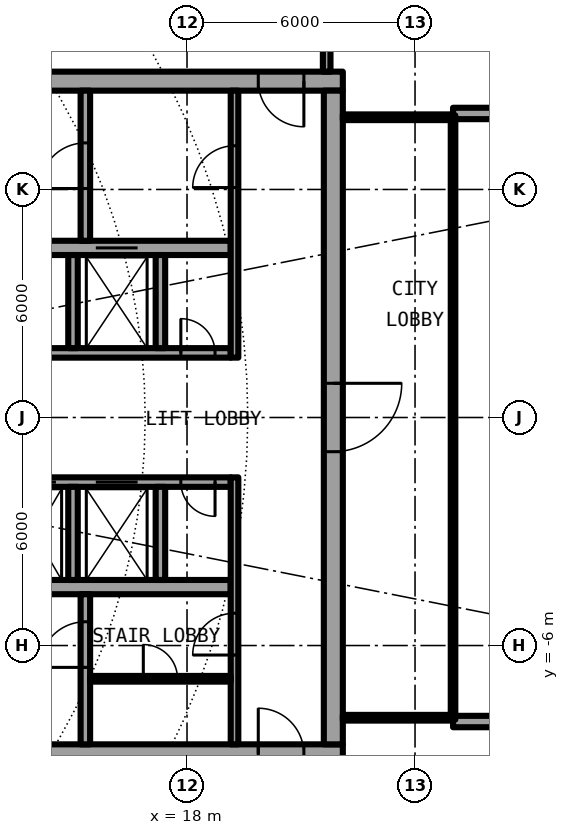
"""IFC4 building model, lengths in metres.
Left out: names, types, materials, properties, quantities, classifications, styles, units other than length and angle.
Written with IfcOpenShell. Run it as: python <this file> out.ifc"""

import sys

from ifc_helpers import new_model, si_unit, direction, frame, frame_2d, origin, place, context, subcontext, project, spatial, rectangle, extrude, element, fill, save


model = new_model("IFC4")
c1 = context("Model", 3, precision=1e-05, world=origin(), true_north=direction((0.0, 1.0)))
c2 = subcontext(c1, "Body", "Model", "MODEL_VIEW")
j1 = project(units=[si_unit("LENGTHUNIT", "METRE"), si_unit("PLANEANGLEUNIT", "RADIAN")], contexts=[c1])
p1 = place(None, origin())
s1 = spatial("IfcSite", under=j1, at=p1, CompositionType="ELEMENT")
p2 = place(p1, origin())
s2 = spatial("IfcBuilding", under=s1, at=p2, CompositionType="ELEMENT")
p3 = place(p2, frame((0.0, 0.0, 173.8)))
s3 = spatial("IfcBuildingStorey", under=s2, at=p3, CompositionType="ELEMENT", Elevation=173.8)
for number, where, z_axis, x_axis in (
    (1, (25.0, 8.0, 0.0), (0.0, 0.0, 1.0), (1.0, 0.0, 0.0)),
    (2, (25.0, -8.0, 0.0), (0.0, 0.0, 1.0), (1.0, 0.0, 0.0)),
):
    element("IfcWall", number, at=place(p3, frame(where, z_axis=z_axis, x_axis=x_axis)), inside=s3, PredefinedType="SOLIDWALL", context=c2, shape_type="SweptSolid", body=[
        extrude(rectangle(XDim=2.667, YDim=0.3, at=frame_2d((1.333, 0.0))), origin(), (0.0, 0.0, 1.0), 2.7),
    ])
p4 = place(p3, frame((22.1, 8.85, 0.0), z_axis=(0.0, 0.0, 1.0), x_axis=(-1.0, 0.0, 0.0)))
e3 = element("IfcWall", 3, at=p4, inside=s3, PredefinedType="SHEAR", context=c2, shape_type="SweptSolid", body=[
    extrude(rectangle(XDim=13.6, YDim=0.5, at=frame_2d((6.8, 0.0))), origin(), (0.0, 0.0, 1.0), 3.05),
])
p5 = place(p4, frame((1.025, 0.0, 0.0)))
e4 = element("IfcOpeningElement", 4, at=p5, cuts=e3, PredefinedType="OPENING", context=c2, shape_type="SweptSolid", body=[
    extrude(rectangle(XDim=1.2, YDim=2.3, at=frame_2d((0.6, 1.15))), frame((0.0, 0.26, 0.0), z_axis=(0.0, -1.0, 0.0), x_axis=(1.0, 0.0, 0.0)), (0.0, 0.0, 1.0), 0.52),
])
p6 = place(p3, frame((8.5, -8.85, 0.0), z_axis=(0.0, 0.0, 1.0), x_axis=(1.0, 0.0, 0.0)))
e5 = element("IfcWall", 5, at=p6, inside=s3, PredefinedType="SHEAR", context=c2, shape_type="SweptSolid", body=[
    extrude(rectangle(XDim=13.6, YDim=0.5, at=frame_2d((6.8, 0.0))), origin(), (0.0, 0.0, 1.0), 3.05),
])
p7 = place(p6, frame((11.375, 0.0, 0.0)))
e6 = element("IfcOpeningElement", 6, at=p7, cuts=e5, PredefinedType="OPENING", context=c2, shape_type="SweptSolid", body=[
    extrude(rectangle(XDim=1.2, YDim=2.3, at=frame_2d((0.6, 1.15))), frame((0.0, 0.26, 0.0), z_axis=(0.0, -1.0, 0.0), x_axis=(1.0, 0.0, 0.0)), (0.0, 0.0, 1.0), 0.52),
])
p8 = place(p3, frame((21.85, 8.6, 0.0), z_axis=(0.0, 0.0, 1.0), x_axis=(0.0, -1.0, 0.0)))
e7 = element("IfcWall", 7, at=p8, inside=s3, PredefinedType="SHEAR", context=c2, shape_type="SweptSolid", body=[
    extrude(rectangle(XDim=17.2, YDim=0.5, at=frame_2d((8.6, 0.0))), origin(), (0.0, 0.0, 1.0), 3.05),
])
p9 = place(p8, frame((7.7, 0.0, 0.0)))
e8 = element("IfcOpeningElement", 8, at=p9, cuts=e7, PredefinedType="OPENING", context=c2, shape_type="SweptSolid", body=[
    extrude(rectangle(XDim=1.8, YDim=2.3, at=frame_2d((0.9, 1.15))), frame((0.0, 0.26, 0.0), z_axis=(0.0, -1.0, 0.0), x_axis=(1.0, 0.0, 0.0)), (0.0, 0.0, 1.0), 0.52),
])
p10 = place(p3, frame((9.0, 1.7, 0.0), z_axis=(0.0, 0.0, 1.0), x_axis=(1.0, 0.0, 0.0)))
e9 = element("IfcWall", 9, at=p10, inside=s3, PredefinedType="SHEAR", context=c2, shape_type="SweptSolid", body=[
    extrude(rectangle(XDim=10.15, YDim=0.25, at=frame_2d((5.075, 0.0))), origin(), (0.0, 0.0, 1.0), 3.05),
])
p11 = place(p10, frame((0.262, 0.0, 0.0)))
e10 = element("IfcOpeningElement", 10, at=p11, cuts=e9, PredefinedType="OPENING", context=c2, shape_type="SweptSolid", body=[
    extrude(rectangle(XDim=0.9, YDim=2.3, at=frame_2d((0.45, 1.15))), frame((0.0, 0.135, 0.0), z_axis=(0.0, -1.0, 0.0), x_axis=(1.0, 0.0, 0.0)), (0.0, 0.0, 1.0), 0.27),
])
p12 = place(p10, frame((2.15, 0.0, 0.0)))
e11 = element("IfcOpeningElement", 11, at=p12, cuts=e9, PredefinedType="OPENING", context=c2, shape_type="SweptSolid", body=[
    extrude(rectangle(XDim=0.9, YDim=2.3, at=frame_2d((0.45, 1.15))), frame((0.0, 0.135, 0.0), z_axis=(0.0, -1.0, 0.0), x_axis=(1.0, 0.0, 0.0)), (0.0, 0.0, 1.0), 0.27),
])
p13 = place(p10, frame((4.375, 0.0, 0.0)))
e12 = element("IfcOpeningElement", 12, at=p13, cuts=e9, PredefinedType="OPENING", context=c2, shape_type="SweptSolid", body=[
    extrude(rectangle(XDim=0.9, YDim=2.3, at=frame_2d((0.45, 1.15))), frame((0.0, 0.135, 0.0), z_axis=(0.0, -1.0, 0.0), x_axis=(1.0, 0.0, 0.0)), (0.0, 0.0, 1.0), 0.27),
])
p14 = place(p10, frame((8.837, 0.0, 0.0)))
e13 = element("IfcOpeningElement", 13, at=p14, cuts=e9, PredefinedType="OPENING", context=c2, shape_type="SweptSolid", body=[
    extrude(rectangle(XDim=0.9, YDim=2.3, at=frame_2d((0.45, 1.15))), frame((0.0, 0.135, 0.0), z_axis=(0.0, -1.0, 0.0), x_axis=(1.0, 0.0, 0.0)), (0.0, 0.0, 1.0), 0.27),
])
p15 = place(p3, frame((9.0, 4.462, 0.0), z_axis=(0.0, 0.0, 1.0), x_axis=(1.0, 0.0, 0.0)))
e14 = element("IfcWall", 14, at=p15, inside=s3, PredefinedType="SHEAR", context=c2, shape_type="SweptSolid", body=[
    extrude(rectangle(XDim=10.15, YDim=0.375, at=frame_2d((5.075, 0.0))), origin(), (0.0, 0.0, 1.0), 3.05),
])
p16 = place(p15, frame((6.6, 0.0, 0.0)))
e15 = element("IfcOpeningElement", 15, at=p16, cuts=e14, PredefinedType="OPENING", context=c2, shape_type="SweptSolid", body=[
    extrude(rectangle(XDim=1.1, YDim=2.3, at=frame_2d((0.55, 1.15))), frame((0.0, 0.198, 0.0), z_axis=(0.0, -1.0, 0.0), x_axis=(1.0, 0.0, 0.0)), (0.0, 0.0, 1.0), 0.395),
])
p17 = place(p3, frame((15.325, 4.65, 0.0), z_axis=(0.0, 0.0, 1.0), x_axis=(0.0, 1.0, 0.0)))
e16 = element("IfcWall", 16, at=p17, inside=s3, PredefinedType="SHEAR", context=c2, shape_type="SweptSolid", body=[
    extrude(rectangle(XDim=3.95, YDim=0.25, at=frame_2d((1.975, 0.0))), origin(), (0.0, 0.0, 1.0), 3.05),
])
p18 = place(p17, frame((1.375, 0.0, 0.0)))
e17 = element("IfcOpeningElement", 17, at=p18, cuts=e16, PredefinedType="OPENING", context=c2, shape_type="SweptSolid", body=[
    extrude(rectangle(XDim=1.2, YDim=2.3, at=frame_2d((0.6, 1.15))), frame((0.0, 0.135, 0.0), z_axis=(0.0, -1.0, 0.0), x_axis=(1.0, 0.0, 0.0)), (0.0, 0.0, 1.0), 0.27),
])
for number, where, z_axis, x_axis in (
    (18, (15.0, 1.825, 0.0), (0.0, 0.0, 1.0), (0.0, 1.0, 0.0)),
    (19, (17.3, 1.825, 0.0), (0.0, 0.0, 1.0), (0.0, 1.0, 0.0)),
):
    element("IfcWall", number, at=place(p3, frame(where, z_axis=z_axis, x_axis=x_axis)), inside=s3, PredefinedType="SOLIDWALL", context=c2, shape_type="SweptSolid", body=[
        extrude(rectangle(XDim=2.45, YDim=0.25, at=frame_2d((1.225, 0.0))), origin(), (0.0, 0.0, 1.0), 2.7),
    ])
p19 = place(p3, frame((19.25, 1.575, 0.0), z_axis=(0.0, 0.0, 1.0), x_axis=(0.0, 1.0, 0.0)))
e20 = element("IfcWall", 20, at=p19, inside=s3, PredefinedType="SOLIDWALL", context=c2, shape_type="SweptSolid", body=[
    extrude(rectangle(XDim=7.025, YDim=0.2, at=frame_2d((3.513, 0.0))), origin(), (0.0, 0.0, 1.0), 2.7),
])
p20 = place(p19, frame((4.475, 0.0, 0.0)))
e21 = element("IfcOpeningElement", 21, at=p20, cuts=e20, PredefinedType="OPENING", context=c2, shape_type="SweptSolid", body=[
    extrude(rectangle(XDim=1.1, YDim=2.3, at=frame_2d((0.55, 1.15))), frame((0.0, 0.11, 0.0), z_axis=(0.0, -1.0, 0.0), x_axis=(1.0, 0.0, 0.0)), (0.0, 0.0, 1.0), 0.22),
])
p21 = place(p3, frame((19.15, -1.7, 0.0), z_axis=(0.0, 0.0, 1.0), x_axis=(-1.0, 0.0, 0.0)))
e22 = element("IfcWall", 22, at=p21, inside=s3, PredefinedType="SHEAR", context=c2, shape_type="SweptSolid", body=[
    extrude(rectangle(XDim=10.15, YDim=0.25, at=frame_2d((5.075, 0.0))), origin(), (0.0, 0.0, 1.0), 3.05),
])
p22 = place(p21, frame((8.663, 0.0, 0.0)))
e23 = element("IfcOpeningElement", 23, at=p22, cuts=e22, PredefinedType="OPENING", context=c2, shape_type="SweptSolid", body=[
    extrude(rectangle(XDim=1.1, YDim=2.3, at=frame_2d((0.55, 1.15))), frame((0.0, 0.135, 0.0), z_axis=(0.0, -1.0, 0.0), x_axis=(1.0, 0.0, 0.0)), (0.0, 0.0, 1.0), 0.27),
])
p23 = place(p21, frame((6.6, 0.0, 0.0)))
e24 = element("IfcOpeningElement", 24, at=p23, cuts=e22, PredefinedType="OPENING", context=c2, shape_type="SweptSolid", body=[
    extrude(rectangle(XDim=1.1, YDim=2.3, at=frame_2d((0.55, 1.15))), frame((0.0, 0.135, 0.0), z_axis=(0.0, -1.0, 0.0), x_axis=(1.0, 0.0, 0.0)), (0.0, 0.0, 1.0), 0.27),
])
p24 = place(p21, frame((4.6, 0.0, 0.0)))
e25 = element("IfcOpeningElement", 25, at=p24, cuts=e22, PredefinedType="OPENING", context=c2, shape_type="SweptSolid", body=[
    extrude(rectangle(XDim=1.1, YDim=2.3, at=frame_2d((0.55, 1.15))), frame((0.0, 0.135, 0.0), z_axis=(0.0, -1.0, 0.0), x_axis=(1.0, 0.0, 0.0)), (0.0, 0.0, 1.0), 0.27),
])
p25 = place(p21, frame((2.45, 0.0, 0.0)))
e26 = element("IfcOpeningElement", 26, at=p25, cuts=e22, PredefinedType="OPENING", context=c2, shape_type="SweptSolid", body=[
    extrude(rectangle(XDim=1.1, YDim=2.3, at=frame_2d((0.55, 1.15))), frame((0.0, 0.135, 0.0), z_axis=(0.0, -1.0, 0.0), x_axis=(1.0, 0.0, 0.0)), (0.0, 0.0, 1.0), 0.27),
])
p26 = place(p21, frame((0.413, 0.0, 0.0)))
e27 = element("IfcOpeningElement", 27, at=p26, cuts=e22, PredefinedType="OPENING", context=c2, shape_type="SweptSolid", body=[
    extrude(rectangle(XDim=0.9, YDim=2.3, at=frame_2d((0.45, 1.15))), frame((0.0, 0.135, 0.0), z_axis=(0.0, -1.0, 0.0), x_axis=(1.0, 0.0, 0.0)), (0.0, 0.0, 1.0), 0.27),
])
p27 = place(p3, frame((9.0, -4.462, 0.0), z_axis=(0.0, 0.0, 1.0), x_axis=(1.0, 0.0, 0.0)))
e28 = element("IfcWall", 28, at=p27, inside=s3, PredefinedType="SHEAR", context=c2, shape_type="SweptSolid", body=[
    extrude(rectangle(XDim=10.15, YDim=0.375, at=frame_2d((5.075, 0.0))), origin(), (0.0, 0.0, 1.0), 3.05),
])
p28 = place(p3, frame((15.325, -8.6, 0.0), z_axis=(0.0, 0.0, 1.0), x_axis=(0.0, 1.0, 0.0)))
e29 = element("IfcWall", 29, at=p28, inside=s3, PredefinedType="SHEAR", context=c2, shape_type="SweptSolid", body=[
    extrude(rectangle(XDim=3.95, YDim=0.25, at=frame_2d((1.975, 0.0))), origin(), (0.0, 0.0, 1.0), 3.05),
])
p29 = place(p28, frame((2.025, 0.0, 0.0)))
e30 = element("IfcOpeningElement", 30, at=p29, cuts=e29, PredefinedType="OPENING", context=c2, shape_type="SweptSolid", body=[
    extrude(rectangle(XDim=1.2, YDim=2.3, at=frame_2d((0.6, 1.15))), frame((0.0, 0.135, 0.0), z_axis=(0.0, -1.0, 0.0), x_axis=(1.0, 0.0, 0.0)), (0.0, 0.0, 1.0), 0.27),
])
for number, where, z_axis, x_axis in (
    (31, (15.0, -1.825, 0.0), (0.0, 0.0, 1.0), (0.0, -1.0, 0.0)),
    (32, (17.3, -1.825, 0.0), (0.0, 0.0, 1.0), (0.0, -1.0, 0.0)),
):
    element("IfcWall", number, at=place(p3, frame(where, z_axis=z_axis, x_axis=x_axis)), inside=s3, PredefinedType="SOLIDWALL", context=c2, shape_type="SweptSolid", body=[
        extrude(rectangle(XDim=2.45, YDim=0.25, at=frame_2d((1.225, 0.0))), origin(), (0.0, 0.0, 1.0), 2.7),
    ])
p30 = place(p3, frame((19.25, -8.6, 0.0), z_axis=(0.0, 0.0, 1.0), x_axis=(0.0, 1.0, 0.0)))
e33 = element("IfcWall", 33, at=p30, inside=s3, PredefinedType="SOLIDWALL", context=c2, shape_type="SweptSolid", body=[
    extrude(rectangle(XDim=7.025, YDim=0.2, at=frame_2d((3.513, 0.0))), origin(), (0.0, 0.0, 1.0), 2.7),
])
p31 = place(p30, frame((2.35, 0.0, 0.0)))
e34 = element("IfcOpeningElement", 34, at=p31, cuts=e33, PredefinedType="OPENING", context=c2, shape_type="SweptSolid", body=[
    extrude(rectangle(XDim=1.1, YDim=2.3, at=frame_2d((0.55, 1.15))), frame((0.0, 0.11, 0.0), z_axis=(0.0, -1.0, 0.0), x_axis=(1.0, 0.0, 0.0)), (0.0, 0.0, 1.0), 0.22),
])
p32 = place(p3, frame((15.45, -6.875, 0.0), z_axis=(0.0, 0.0, 1.0), x_axis=(1.0, 0.0, 0.0)))
e35 = element("IfcWall", 35, at=p32, inside=s3, PredefinedType="PARTITIONING", context=c2, shape_type="SweptSolid", body=[
    extrude(rectangle(XDim=3.7, YDim=0.15, at=frame_2d((1.85, 0.0))), origin(), (0.0, 0.0, 1.0), 2.7),
])
p33 = place(p32, frame((1.4, 0.0, 0.0)))
e36 = element("IfcOpeningElement", 36, at=p33, cuts=e35, PredefinedType="OPENING", context=c2, shape_type="SweptSolid", body=[
    extrude(rectangle(XDim=0.9, YDim=2.3, at=frame_2d((0.45, 1.15))), frame((0.0, 0.085, 0.0), z_axis=(0.0, -1.0, 0.0), x_axis=(1.0, 0.0, 0.0)), (0.0, 0.0, 1.0), 0.17),
])
for number, where, z_axis, x_axis in (
    (37, (22.1, -7.9, 0.0), (0.0, 0.0, 1.0), (1.0, 0.0, 0.0)),
    (38, (22.1, 7.9, 0.0), (0.0, 0.0, 1.0), (1.0, 0.0, 0.0)),
):
    element("IfcWall", number, at=place(p3, frame(where, z_axis=z_axis, x_axis=x_axis)), inside=s3, PredefinedType="PARTITIONING", context=c2, shape_type="SweptSolid", body=[
        extrude(rectangle(XDim=2.84, YDim=0.15, at=frame_2d((1.42, 0.0))), origin(), (0.0, 0.0, 1.0), 2.7),
    ])
p34 = place(p3, frame((25.0, -7.95, 0.0), z_axis=(0.0, 0.0, 1.0), x_axis=(0.0, 1.0, 0.0)))
e39 = element("IfcWall", 39, at=p34, inside=s3, PredefinedType="PARTITIONING", context=c2, shape_type="SweptSolid", body=[
    extrude(rectangle(XDim=15.9, YDim=0.12, at=frame_2d((7.95, 0.0))), origin(), (0.0, 0.0, 1.0), 2.7),
])
p35 = place(p34, frame((0.95, 0.0, 0.1)))
e40 = element("IfcOpeningElement", 40, at=p35, cuts=e39, PredefinedType="OPENING", context=c2, shape_type="SweptSolid", body=[
    extrude(rectangle(XDim=14.0, YDim=2.35, at=frame_2d((7.0, 1.175))), frame((0.0, 0.07, 0.0), z_axis=(0.0, -1.0, 0.0), x_axis=(1.0, 0.0, 0.0)), (0.0, 0.0, 1.0), 0.14),
])
p36 = place(p3, frame((21.675, 9.1, 0.0), z_axis=(0.0, 0.0, 1.0), x_axis=(0.0, 1.0, 0.0)))
e41 = element("IfcWall", 41, at=p36, inside=s3, PredefinedType="PARTITIONING", context=c2, shape_type="SweptSolid", body=[
    extrude(rectangle(XDim=1.75, YDim=0.2, at=frame_2d((0.875, 0.0))), origin(), (0.0, 0.0, 1.0), 2.7),
])
p37 = place(p16, origin())
e42 = element("IfcDoor", 42, at=p37, inside=s3, OperationType="DOUBLE_DOOR_SLIDING", PredefinedType="DOOR", context=c2, shape_type="SweptSolid", body=[
    extrude(rectangle(XDim=1.1, YDim=2.3, at=frame_2d((0.55, 1.15))), frame((0.0, 0.025, 0.0), z_axis=(0.0, -1.0, 0.0), x_axis=(1.0, 0.0, 0.0)), (0.0, 0.0, 1.0), 0.05),
])
fill(e15, e42)
p38 = place(p24, origin())
e43 = element("IfcDoor", 43, at=p38, inside=s3, OperationType="DOUBLE_DOOR_SLIDING", PredefinedType="DOOR", context=c2, shape_type="SweptSolid", body=[
    extrude(rectangle(XDim=1.1, YDim=2.3, at=frame_2d((0.55, 1.15))), frame((0.0, 0.025, 0.0), z_axis=(0.0, -1.0, 0.0), x_axis=(1.0, 0.0, 0.0)), (0.0, 0.0, 1.0), 0.05),
])
fill(e25, e43)
p39 = place(p25, origin())
e44 = element("IfcDoor", 44, at=p39, inside=s3, OperationType="DOUBLE_DOOR_SLIDING", PredefinedType="DOOR", context=c2, shape_type="SweptSolid", body=[
    extrude(rectangle(XDim=1.1, YDim=2.3, at=frame_2d((0.55, 1.15))), frame((0.0, 0.025, 0.0), z_axis=(0.0, -1.0, 0.0), x_axis=(1.0, 0.0, 0.0)), (0.0, 0.0, 1.0), 0.05),
])
fill(e26, e44)
p40 = place(p14, origin())
e45 = element("IfcDoor", 45, at=p40, inside=s3, OperationType="SINGLE_SWING_LEFT", PredefinedType="DOOR", context=c2, shape_type="SweptSolid", body=[
    extrude(rectangle(XDim=0.9, YDim=2.3, at=frame_2d((0.45, 1.15))), frame((0.0, 0.025, 0.0), z_axis=(0.0, -1.0, 0.0), x_axis=(1.0, 0.0, 0.0)), (0.0, 0.0, 1.0), 0.05),
])
fill(e13, e45)
p41 = place(p26, origin())
e46 = element("IfcDoor", 46, at=p41, inside=s3, OperationType="SINGLE_SWING_RIGHT", PredefinedType="DOOR", context=c2, shape_type="SweptSolid", body=[
    extrude(rectangle(XDim=0.9, YDim=2.3, at=frame_2d((0.45, 1.15))), frame((0.0, 0.025, 0.0), z_axis=(0.0, -1.0, 0.0), x_axis=(1.0, 0.0, 0.0)), (0.0, 0.0, 1.0), 0.05),
])
fill(e27, e46)
p42 = place(p33, origin())
e47 = element("IfcDoor", 47, at=p42, inside=s3, OperationType="SINGLE_SWING_LEFT", PredefinedType="DOOR", context=c2, shape_type="SweptSolid", body=[
    extrude(rectangle(XDim=0.9, YDim=2.3, at=frame_2d((0.45, 1.15))), frame((0.0, 0.025, 0.0), z_axis=(0.0, -1.0, 0.0), x_axis=(1.0, 0.0, 0.0)), (0.0, 0.0, 1.0), 0.05),
])
fill(e36, e47)
p43 = place(p18, origin())
e48 = element("IfcDoor", 48, at=p43, inside=s3, OperationType="SINGLE_SWING_LEFT", PredefinedType="DOOR", context=c2, shape_type="SweptSolid", body=[
    extrude(rectangle(XDim=1.2, YDim=2.3, at=frame_2d((0.6, 1.15))), frame((0.0, 0.025, 0.0), z_axis=(0.0, -1.0, 0.0), x_axis=(1.0, 0.0, 0.0)), (0.0, 0.0, 1.0), 0.05),
])
fill(e17, e48)
p44 = place(p29, origin())
e49 = element("IfcDoor", 49, at=p44, inside=s3, OperationType="SINGLE_SWING_LEFT", PredefinedType="DOOR", context=c2, shape_type="SweptSolid", body=[
    extrude(rectangle(XDim=1.2, YDim=2.3, at=frame_2d((0.6, 1.15))), frame((0.0, 0.025, 0.0), z_axis=(0.0, -1.0, 0.0), x_axis=(1.0, 0.0, 0.0)), (0.0, 0.0, 1.0), 0.05),
])
fill(e30, e49)
p45 = place(p20, origin())
e50 = element("IfcDoor", 50, at=p45, inside=s3, OperationType="SINGLE_SWING_LEFT", PredefinedType="DOOR", context=c2, shape_type="SweptSolid", body=[
    extrude(rectangle(XDim=1.1, YDim=2.3, at=frame_2d((0.55, 1.15))), frame((0.0, 0.025, 0.0), z_axis=(0.0, -1.0, 0.0), x_axis=(1.0, 0.0, 0.0)), (0.0, 0.0, 1.0), 0.05),
])
fill(e21, e50)
p46 = place(p31, origin())
e51 = element("IfcDoor", 51, at=p46, inside=s3, OperationType="SINGLE_SWING_RIGHT", PredefinedType="DOOR", context=c2, shape_type="SweptSolid", body=[
    extrude(rectangle(XDim=1.1, YDim=2.3, at=frame_2d((0.55, 1.15))), frame((0.0, 0.025, 0.0), z_axis=(0.0, -1.0, 0.0), x_axis=(1.0, 0.0, 0.0)), (0.0, 0.0, 1.0), 0.05),
])
fill(e34, e51)
p47 = place(p5, origin())
e52 = element("IfcDoor", 52, at=p47, inside=s3, OperationType="SINGLE_SWING_RIGHT", PredefinedType="DOOR", context=c2, shape_type="SweptSolid", body=[
    extrude(rectangle(XDim=1.2, YDim=2.3, at=frame_2d((0.6, 1.15))), frame((0.0, 0.025, 0.0), z_axis=(0.0, -1.0, 0.0), x_axis=(1.0, 0.0, 0.0)), (0.0, 0.0, 1.0), 0.05),
])
fill(e4, e52)
p48 = place(p7, origin())
e53 = element("IfcDoor", 53, at=p48, inside=s3, OperationType="SINGLE_SWING_LEFT", PredefinedType="DOOR", context=c2, shape_type="SweptSolid", body=[
    extrude(rectangle(XDim=1.2, YDim=2.3, at=frame_2d((0.6, 1.15))), frame((0.0, 0.025, 0.0), z_axis=(0.0, -1.0, 0.0), x_axis=(1.0, 0.0, 0.0)), (0.0, 0.0, 1.0), 0.05),
])
fill(e6, e53)
p49 = place(p9, origin())
e54 = element("IfcDoor", 54, at=p49, inside=s3, OperationType="SINGLE_SWING_LEFT", PredefinedType="DOOR", context=c2, shape_type="SweptSolid", body=[
    extrude(rectangle(XDim=1.8, YDim=2.3, at=frame_2d((0.9, 1.15))), frame((0.0, 0.025, 0.0), z_axis=(0.0, -1.0, 0.0), x_axis=(1.0, 0.0, 0.0)), (0.0, 0.0, 1.0), 0.05),
])
fill(e8, e54)
p50 = place(p35, origin())
e55 = element("IfcWindow", 55, at=p50, inside=s3, PartitioningType="SINGLE_PANEL", PredefinedType="WINDOW", context=c2, shape_type="SweptSolid", body=[
    extrude(rectangle(XDim=14.0, YDim=2.35, at=frame_2d((7.0, 1.175))), frame((0.0, 0.03, 0.0), z_axis=(0.0, -1.0, 0.0), x_axis=(1.0, 0.0, 0.0)), (0.0, 0.0, 1.0), 0.06),
])
fill(e40, e55)
save(model, sys.argv[1])
